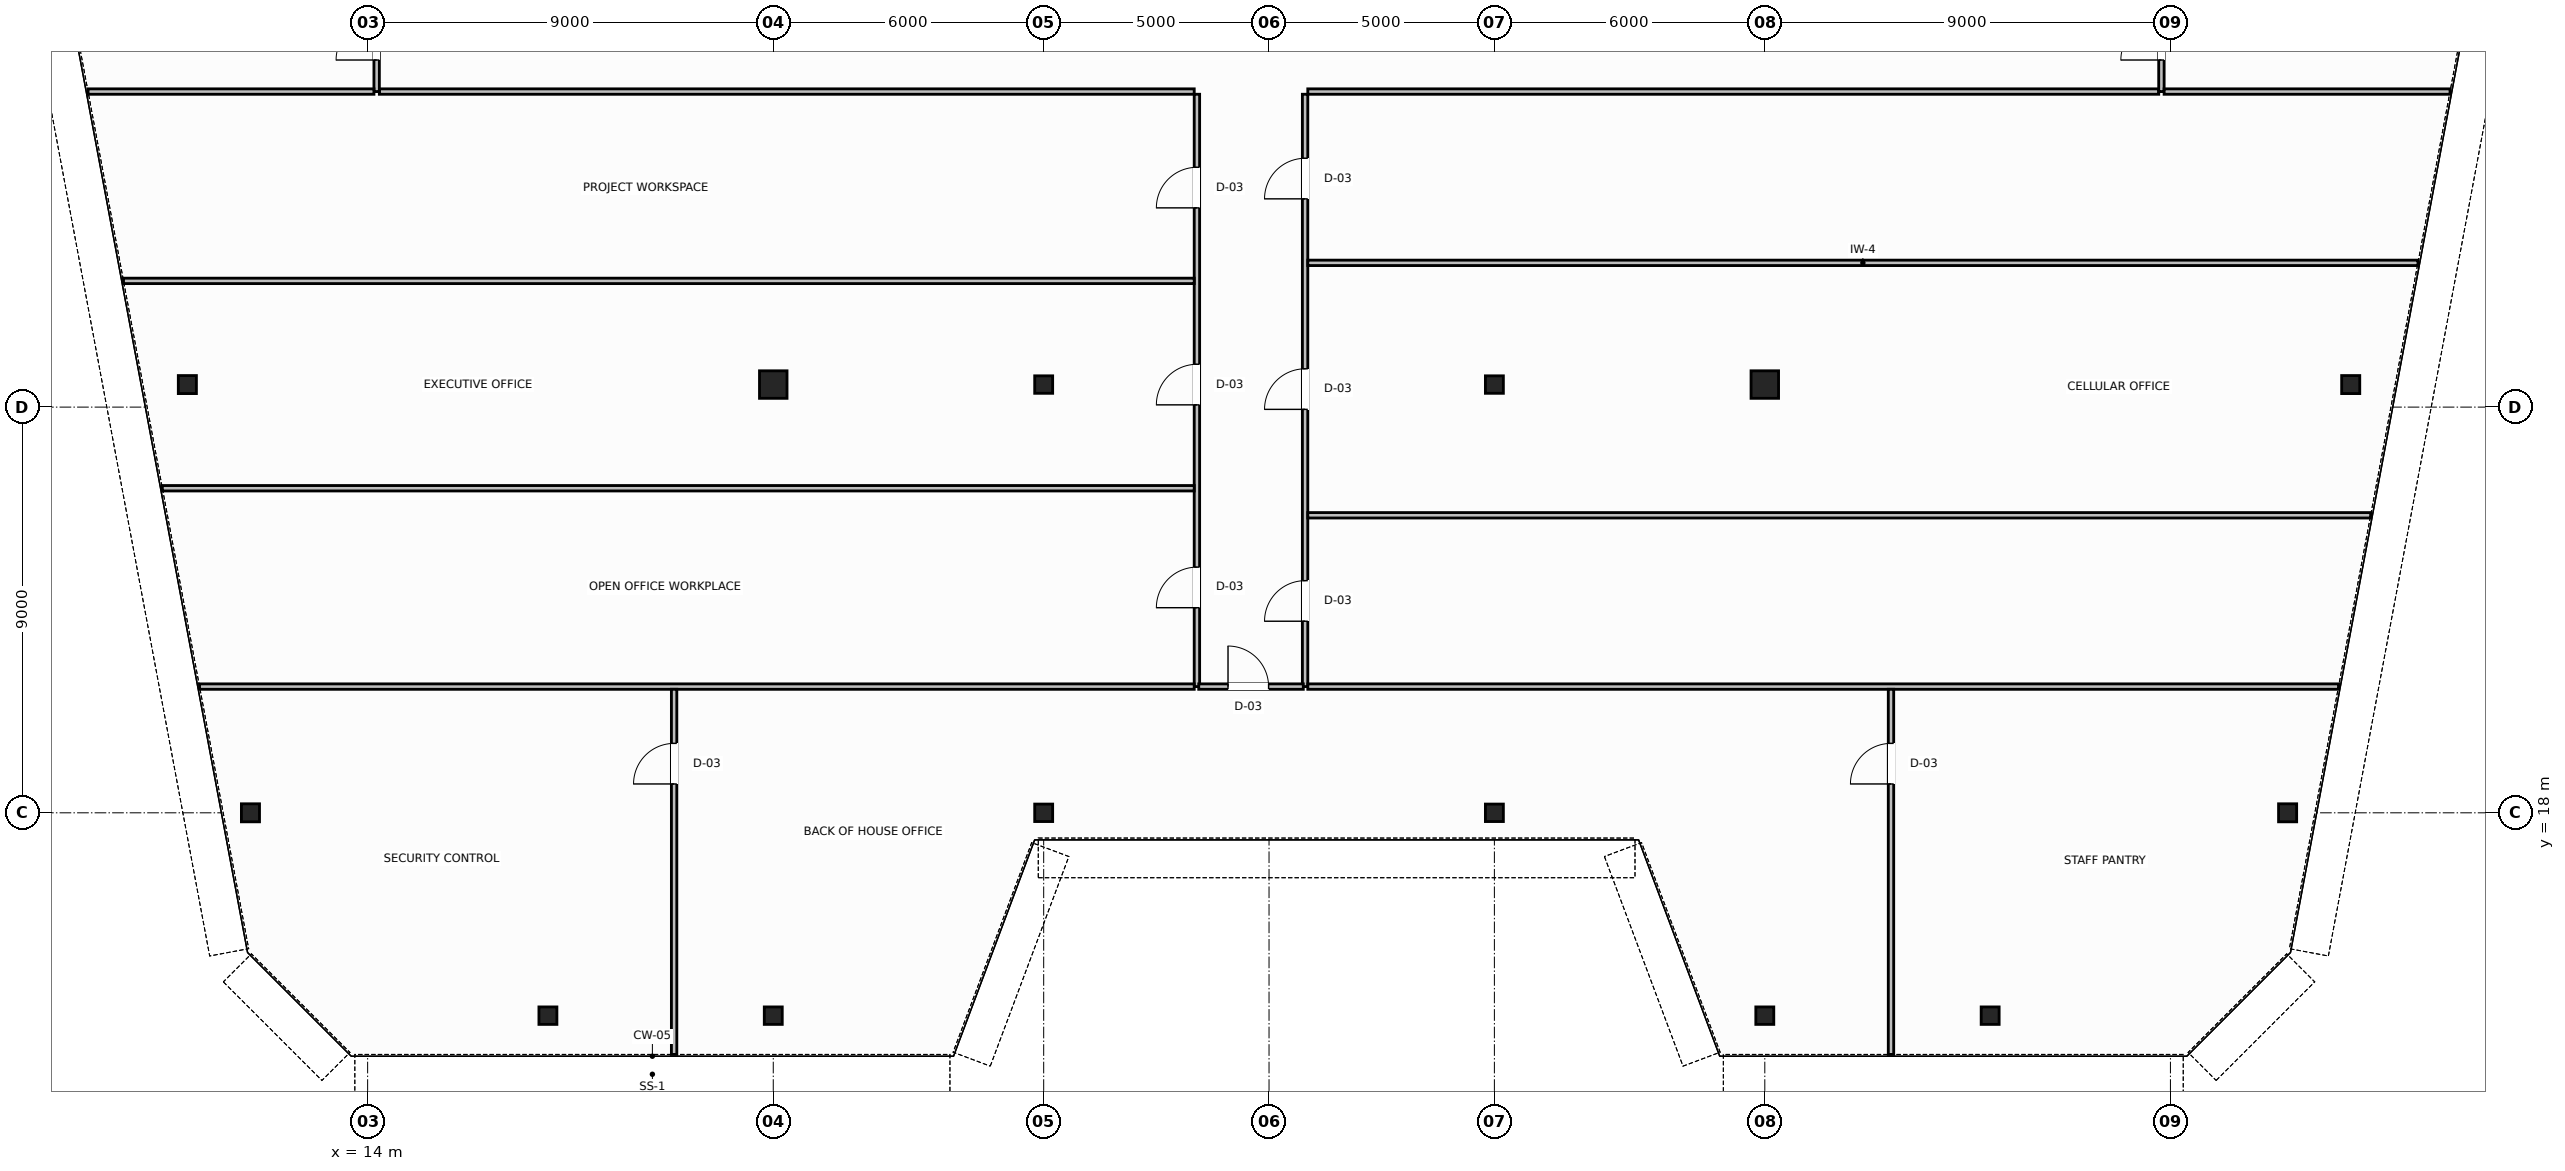
"""IFC4 building model, lengths in metres.
Left out: names, types, materials, properties, quantities, classifications, styles, units other than length and angle.
Written with IfcOpenShell. Run it as: python <this file> out.ifc"""

import sys

from ifc_helpers import new_model, si_unit, direction, frame, frame_2d, origin, origin_2d, place, context, subcontext, project, spatial, rectangle, hollow_circle, i_section, extrude, source, transform, mapped, element, fill, save


model = new_model("IFC4")
c1 = context("Model", 3, precision=1e-05, world=origin(), true_north=direction((0.0, 1.0)))
c2 = subcontext(c1, "Body", "Model", "MODEL_VIEW")
j1 = project(units=[si_unit("LENGTHUNIT", "METRE"), si_unit("PLANEANGLEUNIT", "RADIAN")], contexts=[c1])
p1 = place(None, origin())
s1 = spatial("IfcSite", under=j1, at=p1, CompositionType="ELEMENT")
p2 = place(p1, origin())
s2 = spatial("IfcBuilding", under=s1, at=p2, CompositionType="ELEMENT")
p3 = place(p2, frame((0.0, 0.0, 291.6)))
s3 = spatial("IfcBuildingStorey", under=s2, at=p3, CompositionType="ELEMENT", Elevation=291.6)
m1 = source(origin(), c2, "Body", "SweptSolid", [
    extrude(i_section(OverallWidth=0.401, OverallDepth=0.399, WebThickness=0.025, FlangeThickness=0.035, FilletRadius=0.015, at=origin_2d()), origin(), (0.0, 0.0, 1.0), 3.8),
])
for number, where, z_axis, x_axis in (
    (1, (10.0, 27.5, 0.0), (0.0, 0.0, 1.0), (1.0, 0.0, 0.0)),
    (2, (11.4, 18.0, 0.0), (0.0, 0.0, 1.0), (1.0, 0.0, 0.0)),
    (3, (58.0, 27.5, 0.0), (0.0, 0.0, 1.0), (1.0, 0.0, 0.0)),
    (4, (56.6, 18.0, 0.0), (0.0, 0.0, 1.0), (1.0, 0.0, 0.0)),
):
    element("IfcColumn", number, at=place(p3, frame(where, z_axis=z_axis, x_axis=x_axis)), inside=s3, PredefinedType="COLUMN", context=c2, shape_type="MappedRepresentation", body=[
        mapped(m1, transform((0.0, 0.0, 0.0), scale=1.0)),
    ])
m2 = source(origin(), c2, "Body", "SweptSolid", [
    extrude(hollow_circle(Radius=0.305, WallThickness=0.03, at=origin_2d()), origin(), (0.0, 0.0, 1.0), 3.8),
])
p4 = place(p3, frame((23.0, 27.5, 0.0), z_axis=(0.0, 0.0, 1.0), x_axis=(1.0, 0.0, 0.0)))
e5 = element("IfcColumn", 5, at=p4, inside=s3, PredefinedType="COLUMN", context=c2, shape_type="MappedRepresentation", body=[
    mapped(m2, transform((0.0, 0.0, 0.0), scale=1.0)),
])
m3 = source(origin(), c2, "Body", "SweptSolid", [
    extrude(i_section(OverallWidth=0.398, OverallDepth=0.387, WebThickness=0.021, FlangeThickness=0.029, FilletRadius=0.015, at=origin_2d()), origin(), (0.0, 0.0, 1.0), 3.8),
])
for number, where, z_axis, x_axis in (
    (6, (29.0, 27.5, 0.0), (0.0, 0.0, 1.0), (1.0, 0.0, 0.0)),
    (7, (39.0, 27.5, 0.0), (0.0, 0.0, 1.0), (1.0, 0.0, 0.0)),
):
    element("IfcColumn", number, at=place(p3, frame(where, z_axis=z_axis, x_axis=x_axis)), inside=s3, PredefinedType="COLUMN", context=c2, shape_type="MappedRepresentation", body=[
        mapped(m3, transform((0.0, 0.0, 0.0), scale=1.0)),
    ])
p5 = place(p3, frame((45.0, 27.5, 0.0), z_axis=(0.0, 0.0, 1.0), x_axis=(1.0, 0.0, 0.0)))
e8 = element("IfcColumn", 8, at=p5, inside=s3, PredefinedType="COLUMN", context=c2, shape_type="MappedRepresentation", body=[
    mapped(m2, transform((0.0, 0.0, 0.0), scale=1.0)),
])
for number, where, z_axis, x_axis in (
    (9, (18.0, 13.5, 0.0), (0.0, 0.0, 1.0), (1.0, 0.0, 0.0)),
    (10, (23.0, 13.5, 0.0), (0.0, 0.0, 1.0), (1.0, 0.0, 0.0)),
    (11, (29.0, 18.0, 0.0), (0.0, 0.0, 1.0), (1.0, 0.0, 0.0)),
    (12, (39.0, 18.0, 0.0), (0.0, 0.0, 1.0), (1.0, 0.0, 0.0)),
    (13, (45.0, 13.5, 0.0), (0.0, 0.0, 1.0), (1.0, 0.0, 0.0)),
    (14, (50.0, 13.5, 0.0), (0.0, 0.0, 1.0), (1.0, 0.0, 0.0)),
):
    element("IfcColumn", number, at=place(p3, frame(where, z_axis=z_axis, x_axis=x_axis)), inside=s3, PredefinedType="COLUMN", context=c2, shape_type="MappedRepresentation", body=[
        mapped(m3, transform((0.0, 0.0, 0.0), scale=1.0)),
    ])
p6 = place(p3, frame((14.26, 34.0, 0.0), z_axis=(0.0, 0.0, 1.0), x_axis=(1.0, 0.0, 0.0)))
e15 = element("IfcWall", 15, at=p6, inside=s3, PredefinedType="PARTITIONING", context=c2, shape_type="SweptSolid", body=[
    extrude(rectangle(XDim=18.08, YDim=0.12, at=frame_2d((9.04, 0.0))), origin(), (0.0, 0.0, 1.0), 3.58),
])
p7 = place(p3, frame((34.86, 34.0, 0.0), z_axis=(0.0, 0.0, 1.0), x_axis=(1.0, 0.0, 0.0)))
e16 = element("IfcWall", 16, at=p7, inside=s3, PredefinedType="PARTITIONING", context=c2, shape_type="SweptSolid", body=[
    extrude(rectangle(XDim=18.88, YDim=0.12, at=frame_2d((9.44, 0.0))), origin(), (0.0, 0.0, 1.0), 3.58),
])
p8 = place(p3, frame((14.2, 34.0, 0.0), z_axis=(0.0, 0.0, 1.0), x_axis=(0.0, 1.0, 0.0)))
e17 = element("IfcWall", 17, at=p8, inside=s3, PredefinedType="PARTITIONING", context=c2, shape_type="SweptSolid", body=[
    extrude(rectangle(XDim=2.44, YDim=0.12, at=frame_2d((1.22, 0.0))), origin(), (0.0, 0.0, 1.0), 3.58),
])
p9 = place(p8, frame((0.7, 0.0, 0.0)))
e18 = element("IfcOpeningElement", 18, at=p9, cuts=e17, PredefinedType="OPENING", context=c2, shape_type="SweptSolid", body=[
    extrude(rectangle(XDim=0.9, YDim=2.15, at=frame_2d((0.45, 1.075))), frame((0.0, 0.07, 0.0), z_axis=(0.0, -1.0, 0.0), x_axis=(1.0, 0.0, 0.0)), (0.0, 0.0, 1.0), 0.14),
])
p10 = place(p3, frame((53.8, 34.0, 0.0), z_axis=(0.0, 0.0, 1.0), x_axis=(0.0, 1.0, 0.0)))
e19 = element("IfcWall", 19, at=p10, inside=s3, PredefinedType="PARTITIONING", context=c2, shape_type="SweptSolid", body=[
    extrude(rectangle(XDim=2.44, YDim=0.12, at=frame_2d((1.22, 0.0))), origin(), (0.0, 0.0, 1.0), 3.58),
])
p11 = place(p10, frame((0.7, 0.0, 0.0)))
e20 = element("IfcOpeningElement", 20, at=p11, cuts=e19, PredefinedType="OPENING", context=c2, shape_type="SweptSolid", body=[
    extrude(rectangle(XDim=0.9, YDim=2.15, at=frame_2d((0.45, 1.075))), frame((0.0, 0.07, 0.0), z_axis=(0.0, -1.0, 0.0), x_axis=(1.0, 0.0, 0.0)), (0.0, 0.0, 1.0), 0.14),
])
p12 = place(p3, frame((32.4, 20.8, 0.0), z_axis=(0.0, 0.0, 1.0), x_axis=(0.0, 1.0, 0.0)))
e21 = element("IfcWall", 21, at=p12, inside=s3, PredefinedType="PARTITIONING", context=c2, shape_type="SweptSolid", body=[
    extrude(rectangle(XDim=13.14, YDim=0.12, at=frame_2d((6.57, 0.0))), origin(), (0.0, 0.0, 1.0), 3.58),
])
p13 = place(p12, frame((1.75, 0.0, 0.0)))
e22 = element("IfcOpeningElement", 22, at=p13, cuts=e21, PredefinedType="OPENING", context=c2, shape_type="SweptSolid", body=[
    extrude(rectangle(XDim=0.9, YDim=2.15, at=frame_2d((0.45, 1.075))), frame((0.0, 0.07, 0.0), z_axis=(0.0, -1.0, 0.0), x_axis=(1.0, 0.0, 0.0)), (0.0, 0.0, 1.0), 0.14),
])
p14 = place(p12, frame((6.25, 0.0, 0.0)))
e23 = element("IfcOpeningElement", 23, at=p14, cuts=e21, PredefinedType="OPENING", context=c2, shape_type="SweptSolid", body=[
    extrude(rectangle(XDim=0.9, YDim=2.15, at=frame_2d((0.45, 1.075))), frame((0.0, 0.07, 0.0), z_axis=(0.0, -1.0, 0.0), x_axis=(1.0, 0.0, 0.0)), (0.0, 0.0, 1.0), 0.14),
])
p15 = place(p12, frame((10.62, 0.0, 0.0)))
e24 = element("IfcOpeningElement", 24, at=p15, cuts=e21, PredefinedType="OPENING", context=c2, shape_type="SweptSolid", body=[
    extrude(rectangle(XDim=0.9, YDim=2.15, at=frame_2d((0.45, 1.075))), frame((0.0, 0.07, 0.0), z_axis=(0.0, -1.0, 0.0), x_axis=(1.0, 0.0, 0.0)), (0.0, 0.0, 1.0), 0.14),
])
p16 = place(p3, frame((34.8, 20.8, 0.0), z_axis=(0.0, 0.0, 1.0), x_axis=(0.0, 1.0, 0.0)))
e25 = element("IfcWall", 25, at=p16, inside=s3, PredefinedType="PARTITIONING", context=c2, shape_type="SweptSolid", body=[
    extrude(rectangle(XDim=13.14, YDim=0.12, at=frame_2d((6.57, 0.0))), origin(), (0.0, 0.0, 1.0), 3.58),
])
p17 = place(p16, frame((1.45, 0.0, 0.0)))
e26 = element("IfcOpeningElement", 26, at=p17, cuts=e25, PredefinedType="OPENING", context=c2, shape_type="SweptSolid", body=[
    extrude(rectangle(XDim=0.9, YDim=2.15, at=frame_2d((0.45, 1.075))), frame((0.0, 0.07, 0.0), z_axis=(0.0, -1.0, 0.0), x_axis=(1.0, 0.0, 0.0)), (0.0, 0.0, 1.0), 0.14),
])
p18 = place(p16, frame((6.15, 0.0, 0.0)))
e27 = element("IfcOpeningElement", 27, at=p18, cuts=e25, PredefinedType="OPENING", context=c2, shape_type="SweptSolid", body=[
    extrude(rectangle(XDim=0.9, YDim=2.15, at=frame_2d((0.45, 1.075))), frame((0.0, 0.07, 0.0), z_axis=(0.0, -1.0, 0.0), x_axis=(1.0, 0.0, 0.0)), (0.0, 0.0, 1.0), 0.14),
])
p19 = place(p16, frame((10.82, 0.0, 0.0)))
e28 = element("IfcOpeningElement", 28, at=p19, cuts=e25, PredefinedType="OPENING", context=c2, shape_type="SweptSolid", body=[
    extrude(rectangle(XDim=0.9, YDim=2.15, at=frame_2d((0.45, 1.075))), frame((0.0, 0.07, 0.0), z_axis=(0.0, -1.0, 0.0), x_axis=(1.0, 0.0, 0.0)), (0.0, 0.0, 1.0), 0.14),
])
p20 = place(p3, frame((32.44, 20.8, 0.0), z_axis=(0.0, 0.0, 1.0), x_axis=(1.0, 0.0, 0.0)))
e29 = element("IfcWall", 29, at=p20, inside=s3, PredefinedType="PARTITIONING", context=c2, shape_type="SweptSolid", body=[
    extrude(rectangle(XDim=2.32, YDim=0.12, at=frame_2d((1.16, 0.0))), origin(), (0.0, 0.0, 1.0), 3.58),
])
p21 = place(p20, frame((0.65, 0.0, 0.0)))
e30 = element("IfcOpeningElement", 30, at=p21, cuts=e29, PredefinedType="OPENING", context=c2, shape_type="SweptSolid", body=[
    extrude(rectangle(XDim=0.9, YDim=2.15, at=frame_2d((0.45, 1.075))), frame((0.0, 0.07, 0.0), z_axis=(0.0, -1.0, 0.0), x_axis=(1.0, 0.0, 0.0)), (0.0, 0.0, 1.0), 0.14),
])
for number, where, z_axis, x_axis in (
    (31, (7.796, 34.0, 0.0), (0.0, 0.0, 1.0), (1.0, 0.0, 0.0)),
    (32, (53.86, 34.0, 0.0), (0.0, 0.0, 1.0), (1.0, 0.0, 0.0)),
):
    element("IfcWall", number, at=place(p3, frame(where, z_axis=z_axis, x_axis=x_axis)), inside=s3, PredefinedType="PARTITIONING", context=c2, shape_type="SweptSolid", body=[
        extrude(rectangle(XDim=6.344, YDim=0.12, at=frame_2d((3.172, 0.0))), origin(), (0.0, 0.0, 1.0), 3.58),
    ])
p22 = place(p3, frame((9.445, 25.2, 0.0), z_axis=(0.0, 0.0, 1.0), x_axis=(1.0, 0.0, 0.0)))
e33 = element("IfcWall", 33, at=p22, inside=s3, PredefinedType="PARTITIONING", context=c2, shape_type="SweptSolid", body=[
    extrude(rectangle(XDim=22.895, YDim=0.12, at=frame_2d((11.447, 0.0))), origin(), (0.0, 0.0, 1.0), 3.58),
])
p23 = place(p3, frame((8.583, 29.8, 0.0), z_axis=(0.0, 0.0, 1.0), x_axis=(1.0, 0.0, 0.0)))
e34 = element("IfcWall", 34, at=p23, inside=s3, PredefinedType="PARTITIONING", context=c2, shape_type="SweptSolid", body=[
    extrude(rectangle(XDim=23.757, YDim=0.12, at=frame_2d((11.878, 0.0))), origin(), (0.0, 0.0, 1.0), 3.58),
])
p24 = place(p3, frame((34.86, 24.6, 0.0), z_axis=(0.0, 0.0, 1.0), x_axis=(1.0, 0.0, 0.0)))
e35 = element("IfcWall", 35, at=p24, inside=s3, PredefinedType="PARTITIONING", context=c2, shape_type="SweptSolid", body=[
    extrude(rectangle(XDim=23.582, YDim=0.12, at=frame_2d((11.791, 0.0))), origin(), (0.0, 0.0, 1.0), 3.21),
])
p25 = place(p3, frame((34.86, 30.2, 0.0), z_axis=(0.0, 0.0, 1.0), x_axis=(1.0, 0.0, 0.0)))
e36 = element("IfcWall", 36, at=p25, inside=s3, PredefinedType="PARTITIONING", context=c2, shape_type="SweptSolid", body=[
    extrude(rectangle(XDim=24.632, YDim=0.12, at=frame_2d((12.316, 0.0))), origin(), (0.0, 0.0, 1.0), 3.58),
])
p26 = place(p3, frame((10.27, 20.8, 0.0), z_axis=(0.0, 0.0, 1.0), x_axis=(1.0, 0.0, 0.0)))
e37 = element("IfcWall", 37, at=p26, inside=s3, PredefinedType="PARTITIONING", context=c2, shape_type="SweptSolid", body=[
    extrude(rectangle(XDim=22.07, YDim=0.12, at=frame_2d((11.035, 0.0))), origin(), (0.0, 0.0, 1.0), 3.58),
])
p27 = place(p3, frame((34.86, 20.8, 0.0), z_axis=(0.0, 0.0, 1.0), x_axis=(1.0, 0.0, 0.0)))
e38 = element("IfcWall", 38, at=p27, inside=s3, PredefinedType="PARTITIONING", context=c2, shape_type="SweptSolid", body=[
    extrude(rectangle(XDim=22.87, YDim=0.12, at=frame_2d((11.435, 0.0))), origin(), (0.0, 0.0, 1.0), 3.58),
])
p28 = place(p3, frame((20.8, 12.64, 0.0), z_axis=(0.0, 0.0, 1.0), x_axis=(0.0, 1.0, 0.0)))
e39 = element("IfcWall", 39, at=p28, inside=s3, PredefinedType="PARTITIONING", context=c2, shape_type="SweptSolid", body=[
    extrude(rectangle(XDim=8.1, YDim=0.12, at=frame_2d((4.05, 0.0))), origin(), (0.0, 0.0, 1.0), 3.58),
])
p29 = place(p28, frame((6.0, 0.0, 0.0)))
e40 = element("IfcOpeningElement", 40, at=p29, cuts=e39, PredefinedType="OPENING", context=c2, shape_type="SweptSolid", body=[
    extrude(rectangle(XDim=0.9, YDim=2.15, at=frame_2d((0.45, 1.075))), frame((0.0, 0.07, 0.0), z_axis=(0.0, -1.0, 0.0), x_axis=(1.0, 0.0, 0.0)), (0.0, 0.0, 1.0), 0.14),
])
p30 = place(p3, frame((47.8, 12.64, 0.0), z_axis=(0.0, 0.0, 1.0), x_axis=(0.0, 1.0, 0.0)))
e41 = element("IfcWall", 41, at=p30, inside=s3, PredefinedType="PARTITIONING", context=c2, shape_type="SweptSolid", body=[
    extrude(rectangle(XDim=8.1, YDim=0.12, at=frame_2d((4.05, 0.0))), origin(), (0.0, 0.0, 1.0), 3.58),
])
p31 = place(p30, frame((6.0, 0.0, 0.0)))
e42 = element("IfcOpeningElement", 42, at=p31, cuts=e41, PredefinedType="OPENING", context=c2, shape_type="SweptSolid", body=[
    extrude(rectangle(XDim=0.9, YDim=2.15, at=frame_2d((0.45, 1.075))), frame((0.0, 0.07, 0.0), z_axis=(0.0, -1.0, 0.0), x_axis=(1.0, 0.0, 0.0)), (0.0, 0.0, 1.0), 0.14),
])
m4 = source(origin(), c2, "Body", "SweptSolid", [
    extrude(rectangle(XDim=0.9, YDim=2.15, at=frame_2d((0.45, 1.075))), frame((0.0, 0.025, 0.0), z_axis=(0.0, -1.0, 0.0), x_axis=(1.0, 0.0, 0.0)), (0.0, 0.0, 1.0), 0.05),
])
p32 = place(p9, origin())
e43 = element("IfcDoor", 43, at=p32, inside=s3, OperationType="SINGLE_SWING_LEFT", PredefinedType="DOOR", context=c2, shape_type="MappedRepresentation", body=[
    mapped(m4, transform((0.0, 0.0, 0.0), scale=1.0)),
])
fill(e18, e43)
p33 = place(p11, origin())
e44 = element("IfcDoor", 44, at=p33, inside=s3, OperationType="SINGLE_SWING_RIGHT", PredefinedType="DOOR", context=c2, shape_type="MappedRepresentation", body=[
    mapped(m4, transform((0.0, 0.0, 0.0), scale=1.0)),
])
fill(e20, e44)
p34 = place(p13, origin())
e45 = element("IfcDoor", 45, at=p34, inside=s3, OperationType="SINGLE_SWING_LEFT", PredefinedType="DOOR", context=c2, shape_type="MappedRepresentation", body=[
    mapped(m4, transform((0.0, 0.0, 0.0), scale=1.0)),
])
fill(e22, e45)
p35 = place(p14, origin())
e46 = element("IfcDoor", 46, at=p35, inside=s3, OperationType="SINGLE_SWING_RIGHT", PredefinedType="DOOR", context=c2, shape_type="MappedRepresentation", body=[
    mapped(m4, transform((0.0, 0.0, 0.0), scale=1.0)),
])
fill(e23, e46)
p36 = place(p15, origin())
e47 = element("IfcDoor", 47, at=p36, inside=s3, OperationType="SINGLE_SWING_LEFT", PredefinedType="DOOR", context=c2, shape_type="MappedRepresentation", body=[
    mapped(m4, transform((0.0, 0.0, 0.0), scale=1.0)),
])
fill(e24, e47)
p37 = place(p17, origin())
e48 = element("IfcDoor", 48, at=p37, inside=s3, OperationType="SINGLE_SWING_RIGHT", PredefinedType="DOOR", context=c2, shape_type="MappedRepresentation", body=[
    mapped(m4, transform((0.0, 0.0, 0.0), scale=1.0)),
])
fill(e26, e48)
p38 = place(p18, origin())
e49 = element("IfcDoor", 49, at=p38, inside=s3, OperationType="SINGLE_SWING_LEFT", PredefinedType="DOOR", context=c2, shape_type="MappedRepresentation", body=[
    mapped(m4, transform((0.0, 0.0, 0.0), scale=1.0)),
])
fill(e27, e49)
p39 = place(p19, origin())
e50 = element("IfcDoor", 50, at=p39, inside=s3, OperationType="SINGLE_SWING_RIGHT", PredefinedType="DOOR", context=c2, shape_type="MappedRepresentation", body=[
    mapped(m4, transform((0.0, 0.0, 0.0), scale=1.0)),
])
fill(e28, e50)
p40 = place(p29, origin())
e51 = element("IfcDoor", 51, at=p40, inside=s3, OperationType="SINGLE_SWING_RIGHT", PredefinedType="DOOR", context=c2, shape_type="MappedRepresentation", body=[
    mapped(m4, transform((0.0, 0.0, 0.0), scale=1.0)),
])
fill(e40, e51)
p41 = place(p21, origin())
e52 = element("IfcDoor", 52, at=p41, inside=s3, OperationType="SINGLE_SWING_LEFT", PredefinedType="DOOR", context=c2, shape_type="MappedRepresentation", body=[
    mapped(m4, transform((0.0, 0.0, 0.0), scale=1.0)),
])
fill(e30, e52)
p42 = place(p31, origin())
e53 = element("IfcDoor", 53, at=p42, inside=s3, OperationType="SINGLE_SWING_LEFT", PredefinedType="DOOR", context=c2, shape_type="MappedRepresentation", body=[
    mapped(m4, transform((0.0, 0.0, 0.0), scale=1.0)),
])
fill(e42, e53)
save(model, sys.argv[1])
